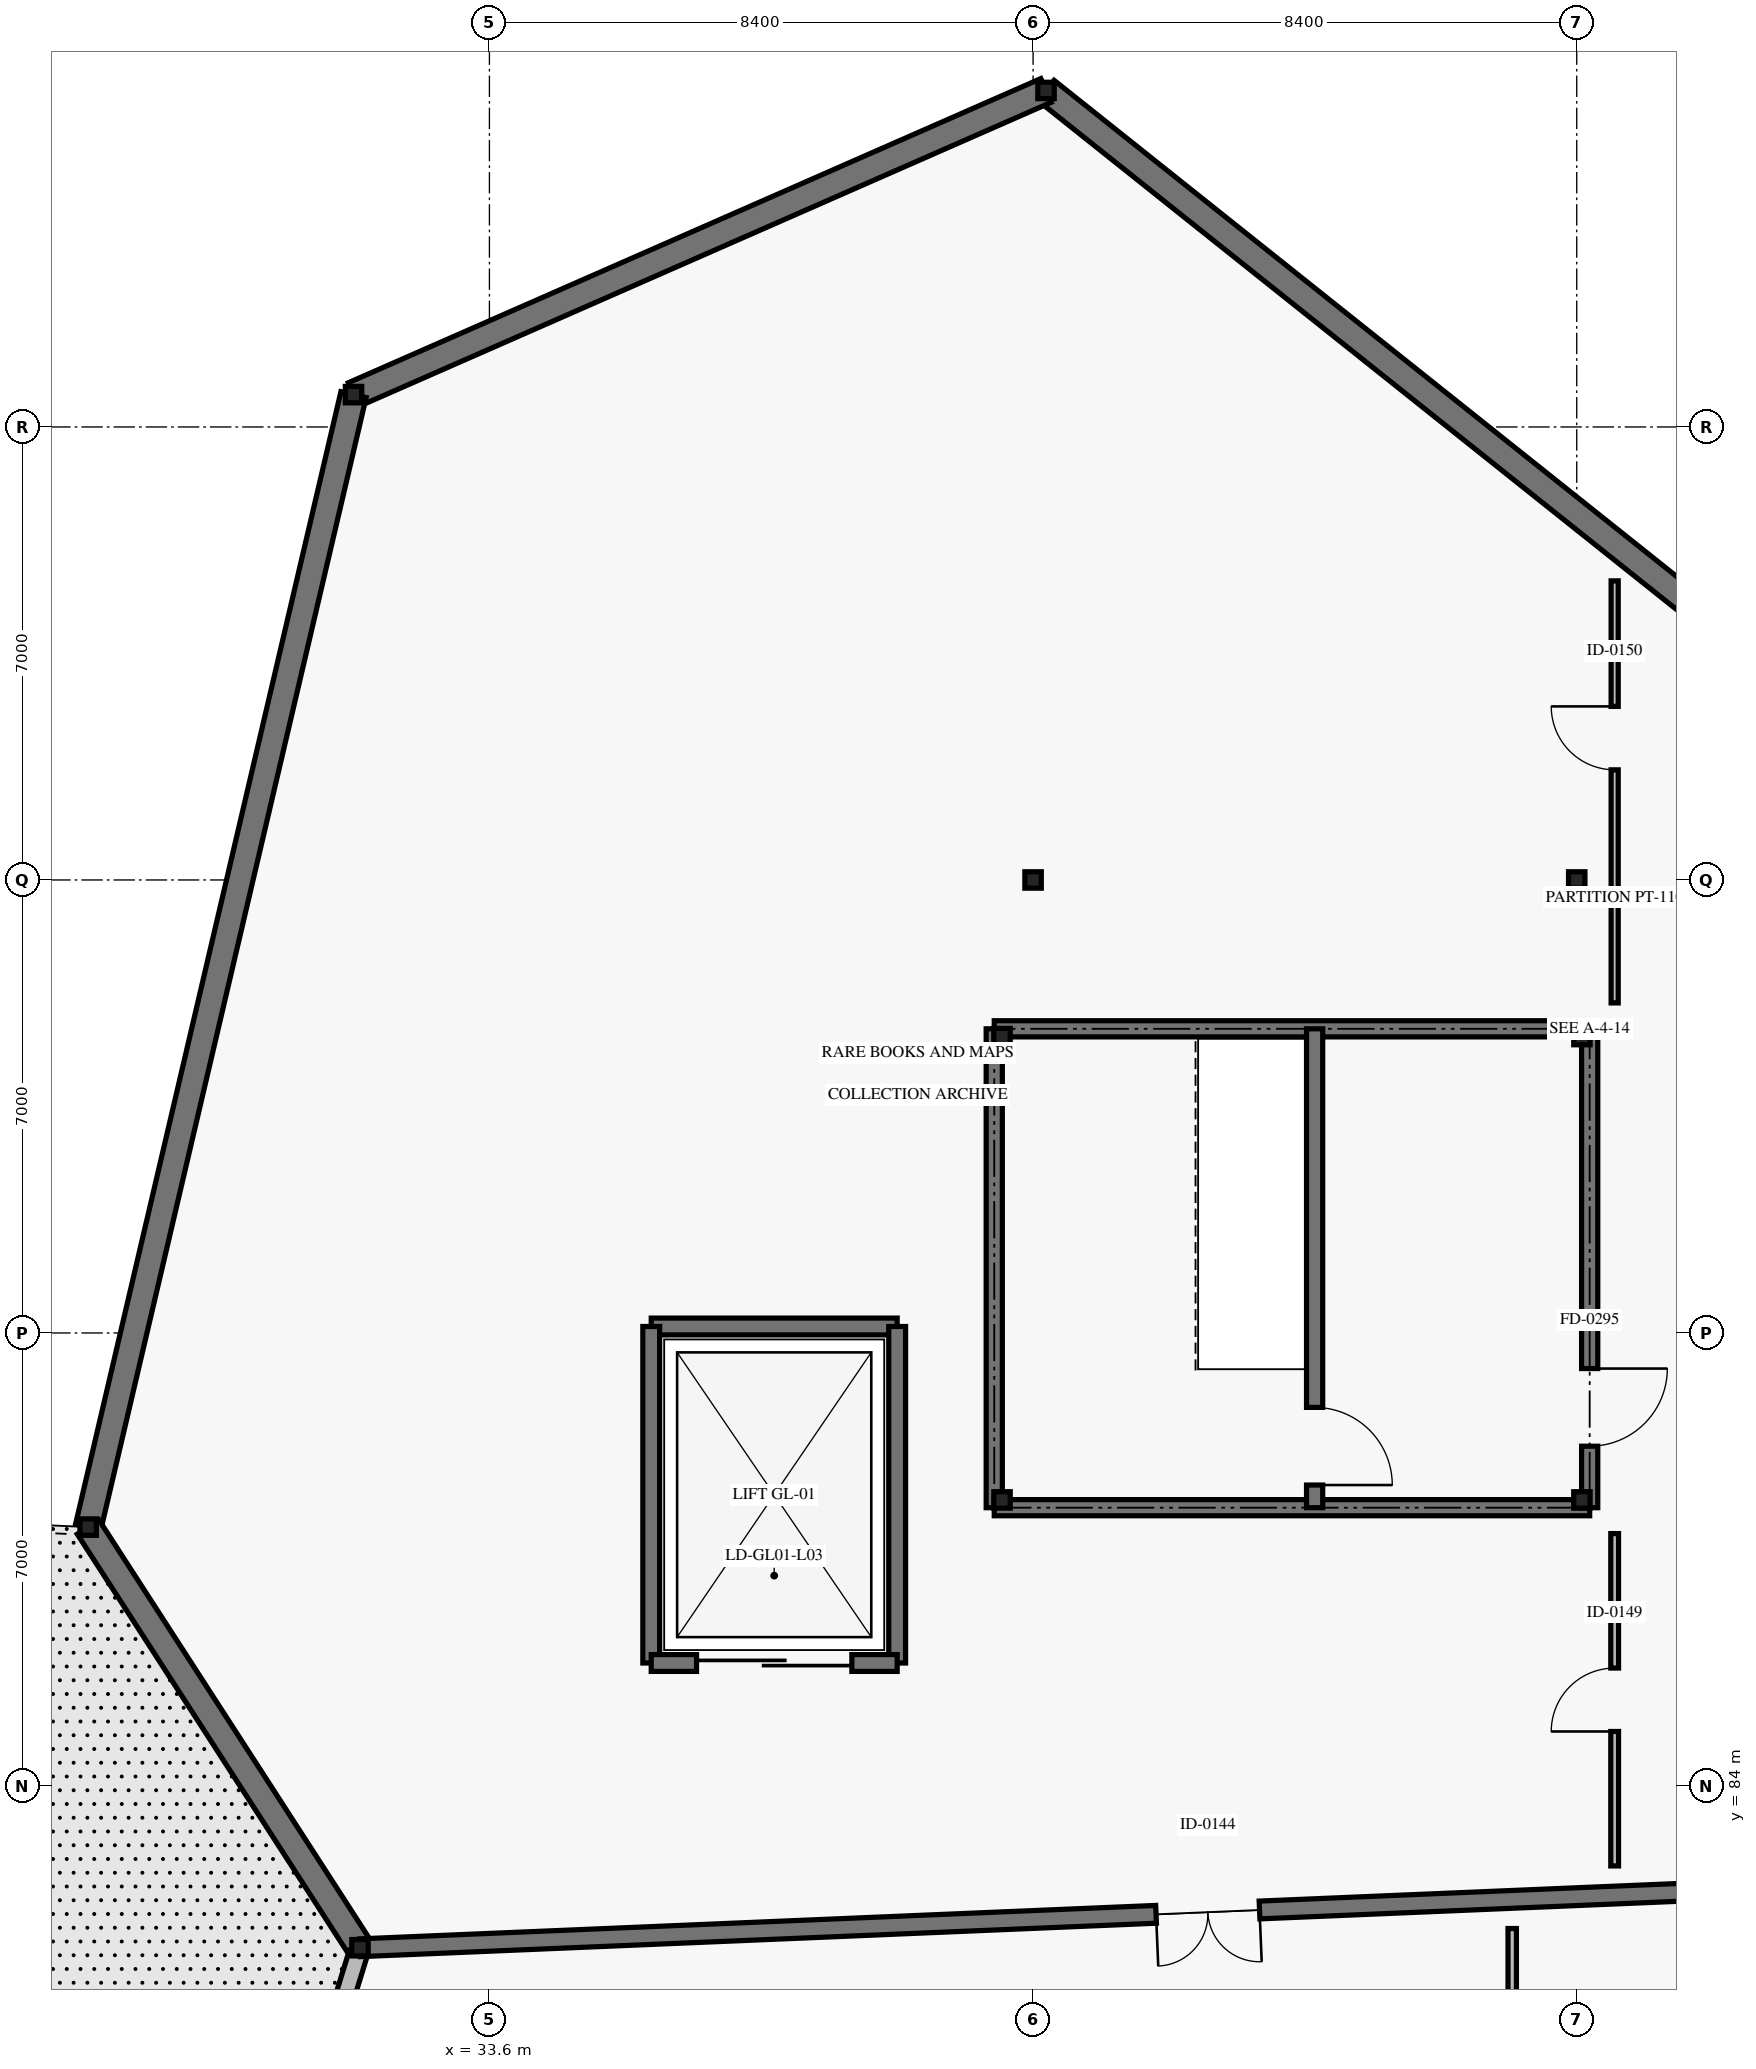
"""IFC4 building model, lengths in metres.
Left out: names, types, materials, properties, quantities, classifications, styles, units other than length and angle.
Written with IfcOpenShell. Run it as: python <this file> out.ifc"""

import sys

from ifc_helpers import new_model, si_unit, direction, frame, frame_2d, origin, origin_2d, place, context, subcontext, project, spatial, rectangle, i_section, extrude, element, fill, save


model = new_model("IFC4")
c1 = context("Model", 3, precision=1e-05, world=origin(), true_north=direction((0.0, 1.0)))
c2 = subcontext(c1, "Body", "Model", "MODEL_VIEW")
j1 = project(units=[si_unit("LENGTHUNIT", "METRE"), si_unit("PLANEANGLEUNIT", "RADIAN")], contexts=[c1])
p1 = place(None, origin())
s1 = spatial("IfcSite", under=j1, at=p1, CompositionType="ELEMENT")
p2 = place(p1, origin())
s2 = spatial("IfcBuilding", under=s1, at=p2, CompositionType="ELEMENT")
p3 = place(p2, frame((0.0, 0.0, 15.0)))
s3 = spatial("IfcBuildingStorey", under=s2, at=p3, CompositionType="ELEMENT", Elevation=15.0)
for number, where, z_axis, x_axis in (
    (1, (27.4, 88.0, 0.0), (0.0, 0.0, 1.0), (1.0, 0.0, 0.0)),
    (2, (31.5, 105.5, 0.0), (0.0, 0.0, 1.0), (1.0, 0.0, 0.0)),
    (3, (31.6, 81.5, 0.0), (0.0, 0.0, 1.0), (1.0, 0.0, 0.0)),
    (4, (42.2, 110.2, 0.0), (0.0, 0.0, 1.0), (1.0, 0.0, 0.0)),
    (5, (42.0, 98.0, 0.0), (0.0, 0.0, 1.0), (1.0, 0.0, 0.0)),
    (6, (50.4, 98.0, 0.0), (0.0, 0.0, 1.0), (1.0, 0.0, 0.0)),
    (7, (41.52, 88.42, 0.0), (0.0, 0.0, 1.0), (1.0, 0.0, 0.0)),
    (8, (50.48, 88.42, 0.0), (0.0, 0.0, 1.0), (1.0, 0.0, 0.0)),
    (9, (50.48, 95.58, 0.0), (0.0, 0.0, 1.0), (1.0, 0.0, 0.0)),
    (10, (41.52, 95.58, 0.0), (0.0, 0.0, 1.0), (1.0, 0.0, 0.0)),
):
    element("IfcColumn", number, at=place(p3, frame(where, z_axis=z_axis, x_axis=x_axis)), inside=s3, PredefinedType="COLUMN", context=c2, shape_type="SweptSolid", body=[
        extrude(i_section(OverallWidth=0.254, OverallDepth=0.254, WebThickness=0.009, FlangeThickness=0.014, FilletRadius=0.013, at=origin_2d()), origin(), (0.0, 0.0, 1.0), 4.8),
    ])
p4 = place(p3, frame((26.3, 64.3, 0.0), z_axis=(0.0, 0.0, 1.0), x_axis=(0.294452119874, 0.955666233108, 0.0)))
e11 = element("IfcWall", 11, at=p4, inside=s3, PredefinedType="SOLIDWALL", context=c2, shape_type="SweptSolid", body=[
    extrude(rectangle(XDim=17.938, YDim=0.29, at=frame_2d((8.969, 0.0))), origin(), (0.0, 0.0, 1.0), 3.62),
])
p5 = place(p4, frame((7.994, 0.0, 0.0)))
e12 = element("IfcOpeningElement", 12, at=p5, cuts=e11, PredefinedType="OPENING", context=c2, shape_type="SweptSolid", body=[
    extrude(rectangle(XDim=1.95, YDim=2.3, at=frame_2d((0.975, 1.15))), frame((0.0, 0.155, 0.0), z_axis=(0.0, -1.0, 0.0), x_axis=(1.0, 0.0, 0.0)), (0.0, 0.0, 1.0), 0.31),
])
p6 = place(p3, frame((42.2, 110.2, 0.0), z_axis=(0.0, 0.0, 1.0), x_axis=(0.78200261515, -0.623275147827, 0.0)))
e13 = element("IfcWall", 13, at=p6, inside=s3, PredefinedType="SOLIDWALL", context=c2, shape_type="SweptSolid", body=[
    extrude(rectangle(XDim=25.831, YDim=0.4, at=frame_2d((12.916, 0.0))), origin(), (0.0, 0.0, 1.0), 3.62),
])
p7 = place(p3, frame((31.5, 105.5, 0.0), z_axis=(0.0, 0.0, 1.0), x_axis=(0.915568057854, 0.40216306573, 0.0)))
e14 = element("IfcWall", 14, at=p7, inside=s3, PredefinedType="SOLIDWALL", context=c2, shape_type="SweptSolid", body=[
    extrude(rectangle(XDim=11.687, YDim=0.4, at=frame_2d((5.843, 0.0))), origin(), (0.0, 0.0, 1.0), 3.62),
])
p8 = place(p3, frame((27.4, 88.0, 0.0), z_axis=(0.0, 0.0, 1.0), x_axis=(0.228114067381, 0.973634414071, 0.0)))
e15 = element("IfcWall", 15, at=p8, inside=s3, PredefinedType="SOLIDWALL", context=c2, shape_type="SweptSolid", body=[
    extrude(rectangle(XDim=17.974, YDim=0.4, at=frame_2d((8.987, 0.0))), origin(), (0.0, 0.0, 1.0), 3.62),
])
p9 = place(p3, frame((31.567, 81.55, 0.0), z_axis=(0.0, 0.0, 1.0), x_axis=(-0.542653962992, 0.839956353895, 0.0)))
e16 = element("IfcWall", 16, at=p9, inside=s3, PredefinedType="SOLIDWALL", context=c2, shape_type="SweptSolid", body=[
    extrude(rectangle(XDim=7.679, YDim=0.4, at=frame_2d((3.839, 0.0))), origin(), (0.0, 0.0, 1.0), 3.62),
])
p10 = place(p3, frame((57.8, 82.6, 0.0), z_axis=(0.0, 0.0, 1.0), x_axis=(-0.999119645224, -0.041951573605, 0.0)))
e17 = element("IfcWall", 17, at=p10, inside=s3, PredefinedType="SOLIDWALL", context=c2, shape_type="SweptSolid", body=[
    extrude(rectangle(XDim=26.223, YDim=0.275, at=frame_2d((13.112, 0.0))), origin(), (0.0, 0.0, 1.0), 4.02),
])
p11 = place(p10, frame((12.312, 0.0, 0.0)))
e18 = element("IfcOpeningElement", 18, at=p11, cuts=e17, PredefinedType="OPENING", context=c2, shape_type="SweptSolid", body=[
    extrude(rectangle(XDim=1.6, YDim=2.45, at=frame_2d((0.8, 1.225))), frame((0.0, 0.147, 0.0), z_axis=(0.0, -1.0, 0.0), x_axis=(1.0, 0.0, 0.0)), (0.0, 0.0, 1.0), 0.295),
])
p12 = place(p3, frame((49.403, 57.267, 0.0), z_axis=(0.0, 0.0, 1.0), x_axis=(0.0, 1.0, 0.0)))
e19 = element("IfcWall", 19, at=p12, inside=s3, PredefinedType="PARTITIONING", context=c2, shape_type="SweptSolid", body=[
    extrude(rectangle(XDim=24.53, YDim=0.13, at=frame_2d((12.265, 0.0))), origin(), (0.0, 0.0, 1.0), 3.32),
])
p13 = place(p12, frame((11.79, 0.0, 0.0)))
e20 = element("IfcOpeningElement", 20, at=p13, cuts=e19, PredefinedType="OPENING", context=c2, shape_type="SweptSolid", body=[
    extrude(rectangle(XDim=0.95, YDim=2.15, at=frame_2d((0.475, 1.075))), frame((0.0, 0.075, 0.0), z_axis=(0.0, -1.0, 0.0), x_axis=(1.0, 0.0, 0.0)), (0.0, 0.0, 1.0), 0.15),
])
p14 = place(p3, frame((50.986, 82.764, 0.0), z_axis=(0.0, 0.0, 1.0), x_axis=(0.0, 1.0, 0.0)))
e21 = element("IfcWall", 21, at=p14, inside=s3, PredefinedType="PARTITIONING", context=c2, shape_type="SweptSolid", body=[
    extrude(rectangle(XDim=5.136, YDim=0.12, at=frame_2d((2.568, 0.0))), origin(), (0.0, 0.0, 1.0), 3.32),
])
p15 = place(p14, frame((2.078, 0.0, 0.0)))
e22 = element("IfcOpeningElement", 22, at=p15, cuts=e21, PredefinedType="OPENING", context=c2, shape_type="SweptSolid", body=[
    extrude(rectangle(XDim=0.98, YDim=2.15, at=frame_2d((0.49, 1.075))), frame((0.0, 0.07, 0.0), z_axis=(0.0, -1.0, 0.0), x_axis=(1.0, 0.0, 0.0)), (0.0, 0.0, 1.0), 0.14),
])
p16 = place(p3, frame((50.986, 96.1, 0.0), z_axis=(0.0, 0.0, 1.0), x_axis=(0.0, 1.0, 0.0)))
e23 = element("IfcWall", 23, at=p16, inside=s3, PredefinedType="PARTITIONING", context=c2, shape_type="SweptSolid", body=[
    extrude(rectangle(XDim=6.522, YDim=0.11, at=frame_2d((3.261, 0.0))), origin(), (0.0, 0.0, 1.0), 3.32),
])
p17 = place(p16, frame((3.602, 0.0, 0.0)))
e24 = element("IfcOpeningElement", 24, at=p17, cuts=e23, PredefinedType="OPENING", context=c2, shape_type="SweptSolid", body=[
    extrude(rectangle(XDim=0.98, YDim=2.15, at=frame_2d((0.49, 1.075))), frame((0.0, 0.065, 0.0), z_axis=(0.0, -1.0, 0.0), x_axis=(1.0, 0.0, 0.0)), (0.0, 0.0, 1.0), 0.13),
])
p18 = place(p3, frame((41.4, 88.3, 0.0), z_axis=(0.0, 0.0, 1.0), x_axis=(0.0, 1.0, 0.0)))
e25 = element("IfcWall", 25, at=p18, inside=s3, PredefinedType="SHEAR", context=c2, shape_type="SweptSolid", body=[
    extrude(rectangle(XDim=7.4, YDim=0.25, at=frame_2d((3.7, 0.0))), origin(), (0.0, 0.0, 1.0), 4.56),
])
for number, where, z_axis, x_axis in (
    (26, (41.4, 95.7, 0.0), (0.0, 0.0, 1.0), (1.0, 0.0, 0.0)),
    (27, (50.6, 88.3, 0.0), (0.0, 0.0, 1.0), (-1.0, 0.0, 0.0)),
):
    element("IfcWall", number, at=place(p3, frame(where, z_axis=z_axis, x_axis=x_axis)), inside=s3, PredefinedType="SHEAR", context=c2, shape_type="SweptSolid", body=[
        extrude(rectangle(XDim=9.2, YDim=0.25, at=frame_2d((4.6, 0.0))), origin(), (0.0, 0.0, 1.0), 4.56),
    ])
p19 = place(p3, frame((50.6, 95.7, 0.0), z_axis=(0.0, 0.0, 1.0), x_axis=(0.0, -1.0, 0.0)))
e28 = element("IfcWall", 28, at=p19, inside=s3, PredefinedType="SHEAR", context=c2, shape_type="SweptSolid", body=[
    extrude(rectangle(XDim=7.4, YDim=0.25, at=frame_2d((3.7, 0.0))), origin(), (0.0, 0.0, 1.0), 4.56),
])
p20 = place(p19, frame((5.25, 0.0, 0.0)))
e29 = element("IfcOpeningElement", 29, at=p20, cuts=e28, PredefinedType="OPENING", context=c2, shape_type="SweptSolid", body=[
    extrude(rectangle(XDim=1.2, YDim=2.2, at=frame_2d((0.6, 1.1))), frame((0.0, 0.135, 0.0), z_axis=(0.0, -1.0, 0.0), x_axis=(1.0, 0.0, 0.0)), (0.0, 0.0, 1.0), 0.27),
])
p21 = place(p3, frame((46.35, 95.7, 0.0), z_axis=(0.0, 0.0, 1.0), x_axis=(0.0, -1.0, 0.0)))
e30 = element("IfcWall", 30, at=p21, inside=s3, PredefinedType="SHEAR", context=c2, shape_type="SweptSolid", body=[
    extrude(rectangle(XDim=7.4, YDim=0.25, at=frame_2d((3.7, 0.0))), origin(), (0.0, 0.0, 1.0), 4.56),
])
p22 = place(p21, frame((5.85, 0.0, 0.0)))
e31 = element("IfcOpeningElement", 31, at=p22, cuts=e30, PredefinedType="OPENING", context=c2, shape_type="SweptSolid", body=[
    extrude(rectangle(XDim=1.2, YDim=2.2, at=frame_2d((0.6, 1.1))), frame((0.0, 0.135, 0.0), z_axis=(0.0, -1.0, 0.0), x_axis=(1.0, 0.0, 0.0)), (0.0, 0.0, 1.0), 0.27),
])
p23 = place(p3, frame((36.1, 91.1, 0.0), z_axis=(0.0, 0.0, 1.0), x_axis=(1.0, 0.0, 0.0)))
e32 = element("IfcWall", 32, at=p23, inside=s3, PredefinedType="SHEAR", context=c2, shape_type="SweptSolid", body=[
    extrude(rectangle(XDim=3.8, YDim=0.26, at=frame_2d((1.9, 0.0))), origin(), (0.0, 0.0, 1.0), 5.9),
])
for number, where, z_axis, x_axis in (
    (33, (39.9, 91.1, 0.0), (0.0, 0.0, 1.0), (0.0, -1.0, 0.0)),
    (34, (36.1, 85.9, 0.0), (0.0, 0.0, 1.0), (0.0, 1.0, 0.0)),
):
    element("IfcWall", number, at=place(p3, frame(where, z_axis=z_axis, x_axis=x_axis)), inside=s3, PredefinedType="SHEAR", context=c2, shape_type="SweptSolid", body=[
        extrude(rectangle(XDim=5.2, YDim=0.26, at=frame_2d((2.6, 0.0))), origin(), (0.0, 0.0, 1.0), 5.9),
    ])
p24 = place(p3, frame((39.9, 85.9, 0.0), z_axis=(0.0, 0.0, 1.0), x_axis=(-1.0, 0.0, 0.0)))
e35 = element("IfcWall", 35, at=p24, inside=s3, PredefinedType="SHEAR", context=c2, shape_type="SweptSolid", body=[
    extrude(rectangle(XDim=3.8, YDim=0.26, at=frame_2d((1.9, 0.0))), origin(), (0.0, 0.0, 1.0), 5.9),
])
p25 = place(p24, frame((0.7, 0.0, 0.0)))
e36 = element("IfcOpeningElement", 36, at=p25, cuts=e35, PredefinedType="OPENING", context=c2, shape_type="SweptSolid", body=[
    extrude(rectangle(XDim=2.4, YDim=2.85, at=frame_2d((1.2, 1.425))), frame((0.0, 0.14, 0.0), z_axis=(0.0, -1.0, 0.0), x_axis=(1.0, 0.0, 0.0)), (0.0, 0.0, 1.0), 0.28),
])
p26 = place(p11, origin())
e37 = element("IfcDoor", 37, at=p26, inside=s3, OperationType="DOUBLE_DOOR_SINGLE_SWING", PredefinedType="DOOR", context=c2, shape_type="SweptSolid", body=[
    extrude(rectangle(XDim=1.6, YDim=2.45, at=frame_2d((0.8, 1.225))), frame((0.0, 0.025, 0.0), z_axis=(0.0, -1.0, 0.0), x_axis=(1.0, 0.0, 0.0)), (0.0, 0.0, 1.0), 0.05),
])
fill(e18, e37)
p27 = place(p15, origin())
e38 = element("IfcDoor", 38, at=p27, inside=s3, OperationType="SINGLE_SWING_LEFT", PredefinedType="DOOR", context=c2, shape_type="SweptSolid", body=[
    extrude(rectangle(XDim=0.98, YDim=2.15, at=frame_2d((0.49, 1.075))), frame((0.0, 0.025, 0.0), z_axis=(0.0, -1.0, 0.0), x_axis=(1.0, 0.0, 0.0)), (0.0, 0.0, 1.0), 0.05),
])
fill(e22, e38)
p28 = place(p17, origin())
e39 = element("IfcDoor", 39, at=p28, inside=s3, OperationType="SINGLE_SWING_RIGHT", PredefinedType="DOOR", context=c2, shape_type="SweptSolid", body=[
    extrude(rectangle(XDim=0.98, YDim=2.15, at=frame_2d((0.49, 1.075))), frame((0.0, 0.025, 0.0), z_axis=(0.0, -1.0, 0.0), x_axis=(1.0, 0.0, 0.0)), (0.0, 0.0, 1.0), 0.05),
])
fill(e24, e39)
p29 = place(p20, origin())
e40 = element("IfcDoor", 40, at=p29, inside=s3, OperationType="SINGLE_SWING_LEFT", PredefinedType="DOOR", context=c2, shape_type="SweptSolid", body=[
    extrude(rectangle(XDim=1.2, YDim=2.2, at=frame_2d((0.6, 1.1))), frame((0.0, 0.025, 0.0), z_axis=(0.0, -1.0, 0.0), x_axis=(1.0, 0.0, 0.0)), (0.0, 0.0, 1.0), 0.05),
])
fill(e29, e40)
p30 = place(p22, origin())
e41 = element("IfcDoor", 41, at=p30, inside=s3, OperationType="SINGLE_SWING_RIGHT", PredefinedType="DOOR", context=c2, shape_type="SweptSolid", body=[
    extrude(rectangle(XDim=1.2, YDim=2.2, at=frame_2d((0.6, 1.1))), frame((0.0, 0.025, 0.0), z_axis=(0.0, -1.0, 0.0), x_axis=(1.0, 0.0, 0.0)), (0.0, 0.0, 1.0), 0.05),
])
fill(e31, e41)
p31 = place(p25, origin())
e42 = element("IfcDoor", 42, at=p31, inside=s3, OperationType="SLIDING_TO_LEFT", PredefinedType="DOOR", context=c2, shape_type="SweptSolid", body=[
    extrude(rectangle(XDim=2.4, YDim=2.85, at=frame_2d((1.2, 1.425))), frame((0.0, 0.025, 0.0), z_axis=(0.0, -1.0, 0.0), x_axis=(1.0, 0.0, 0.0)), (0.0, 0.0, 1.0), 0.05),
])
fill(e36, e42)
save(model, sys.argv[1])
